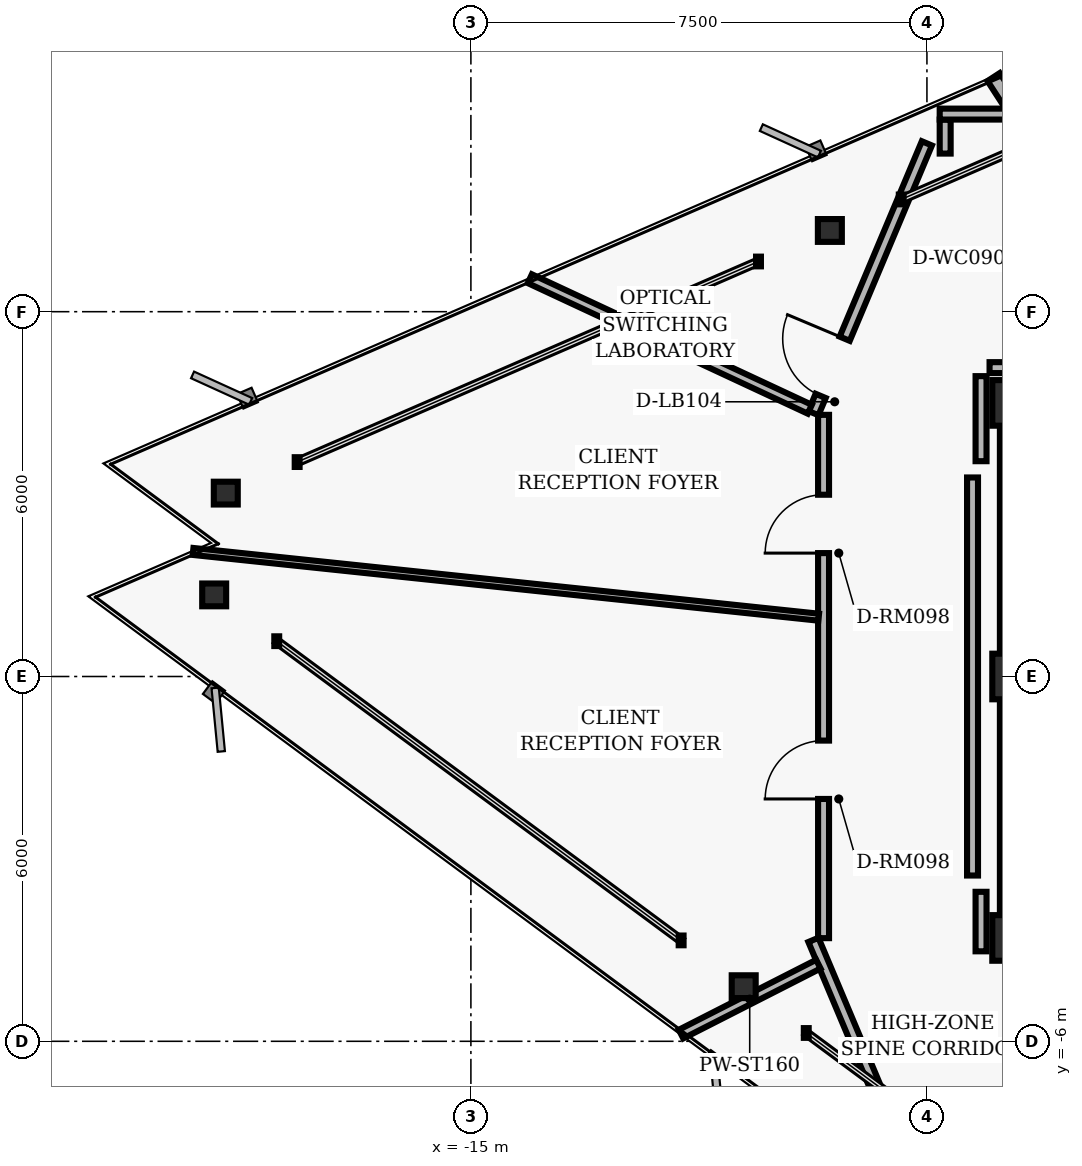
"""IFC4 building model, lengths in metres.
Left out: names, types, materials, properties, quantities, classifications, styles, units other than length and angle.
Written with IfcOpenShell. Run it as: python <this file> out.ifc"""

import sys

from ifc_helpers import new_model, si_unit, direction, frame, frame_2d, origin, origin_2d, place, context, subcontext, project, spatial, rectangle, hollow_rectangle, i_section, extrude, element, fill, save


model = new_model("IFC4")
c1 = context("Model", 3, precision=1e-05, world=origin(), true_north=direction((0.0, 1.0)))
c2 = subcontext(c1, "Body", "Model", "MODEL_VIEW")
j1 = project(units=[si_unit("LENGTHUNIT", "METRE"), si_unit("PLANEANGLEUNIT", "RADIAN")], contexts=[c1])
p1 = place(None, origin())
s1 = spatial("IfcSite", under=j1, at=p1, CompositionType="ELEMENT")
p2 = place(p1, origin())
s2 = spatial("IfcBuilding", under=s1, at=p2, CompositionType="ELEMENT")
p3 = place(p2, frame((0.0, 0.0, 224.0)))
s3 = spatial("IfcBuildingStorey", under=s2, at=p3, CompositionType="ELEMENT", Elevation=224.0)
for number, where, z_axis, x_axis in (
    (1, (-6.05, 4.5, 0.0), (0.0, 0.0, 1.0), (1.0, 0.0, 0.0)),
    (2, (-6.05, 0.0, 0.0), (0.0, 0.0, 1.0), (1.0, 0.0, 0.0)),
    (3, (-6.05, -4.3, 0.0), (0.0, 0.0, 1.0), (1.0, 0.0, 0.0)),
):
    element("IfcColumn", number, at=place(p3, frame(where, z_axis=z_axis, x_axis=x_axis)), inside=s3, PredefinedType="COLUMN", context=c2, shape_type="SweptSolid", body=[
        extrude(hollow_rectangle(XDim=0.75, YDim=0.75, WallThickness=0.05, InnerFilletRadius=0.02, OuterFilletRadius=0.04, at=origin_2d()), origin(), (0.0, 0.0, 1.0), 3.04),
    ])
p4 = place(p3, frame((-6.05, 0.375, 0.0), z_axis=(0.0, 0.0, 1.0), x_axis=(0.0, 1.0, 0.0)))
e4 = element("IfcWall", 4, at=p4, inside=s3, PredefinedType="SHEAR", context=c2, shape_type="SweptSolid", body=[
    extrude(rectangle(XDim=3.75, YDim=0.5, at=frame_2d((1.875, 0.0))), origin(), (0.0, 0.0, 1.0), 2.798),
])
p5 = place(p3, frame((-6.05, -3.925, 0.0), z_axis=(0.0, 0.0, 1.0), x_axis=(0.0, 1.0, 0.0)))
e5 = element("IfcWall", 5, at=p5, inside=s3, PredefinedType="SHEAR", context=c2, shape_type="SweptSolid", body=[
    extrude(rectangle(XDim=3.55, YDim=0.5, at=frame_2d((1.775, 0.0))), origin(), (0.0, 0.0, 1.0), 2.798),
])
for number, where, z_axis, x_axis in (
    (6, (-9.096, 7.336, 0.0), (0.0, 0.0, 1.0), (1.0, 0.0, 0.0)),
    (7, (-19.031, 3.016, 0.0), (0.0, 0.0, 1.0), (1.0, 0.0, 0.0)),
    (8, (-19.222, 1.342, 0.0), (0.0, 0.0, 1.0), (1.0, 0.0, 0.0)),
    (9, (-10.513, -5.102, 0.0), (0.0, 0.0, 1.0), (1.0, 0.0, 0.0)),
):
    element("IfcColumn", number, at=place(p3, frame(where, z_axis=z_axis, x_axis=x_axis)), inside=s3, PredefinedType="COLUMN", context=c2, shape_type="SweptSolid", body=[
        extrude(i_section(OverallWidth=0.394, OverallDepth=0.375, WebThickness=0.017, FlangeThickness=0.028, FilletRadius=0.016, at=origin_2d()), origin(), (0.0, 0.0, 1.0), 3.04),
    ])
p6 = place(p3, frame((-7.574, -8.596, 0.0), z_axis=(0.0, 0.0, 1.0), x_axis=(-0.38757793583, 0.921836939842, 0.0)))
e10 = element("IfcWall", 10, at=p6, inside=s3, PredefinedType="PARTITIONING", context=c2, shape_type="SweptSolid", body=[
    extrude(rectangle(XDim=4.625, YDim=0.18, at=frame_2d((2.313, 0.0))), origin(), (0.0, 0.0, 1.0), 2.773),
])
p7 = place(p3, frame((-9.2, -4.303, 0.0), z_axis=(0.0, 0.0, 1.0), x_axis=(0.0, 1.0, 0.0)))
e11 = element("IfcWall", 11, at=p7, inside=s3, PredefinedType="PARTITIONING", context=c2, shape_type="SweptSolid", body=[
    extrude(rectangle(XDim=8.607, YDim=0.18, at=frame_2d((4.303, 0.0))), origin(), (0.0, 0.0, 1.0), 2.773),
])
p8 = place(p7, frame((2.289, 0.0, 0.0)))
e12 = element("IfcOpeningElement", 12, at=p8, cuts=e11, PredefinedType="OPENING", context=c2, shape_type="SweptSolid", body=[
    extrude(rectangle(XDim=0.96, YDim=2.02, at=frame_2d((0.48, 1.01))), frame((0.0, 0.1, 0.0), z_axis=(0.0, -1.0, 0.0), x_axis=(1.0, 0.0, 0.0)), (0.0, 0.0, 1.0), 0.2),
])
p9 = place(p7, frame((6.333, 0.0, 0.0)))
e13 = element("IfcOpeningElement", 13, at=p9, cuts=e11, PredefinedType="OPENING", context=c2, shape_type="SweptSolid", body=[
    extrude(rectangle(XDim=0.96, YDim=2.02, at=frame_2d((0.48, 1.01))), frame((0.0, 0.1, 0.0), z_axis=(0.0, -1.0, 0.0), x_axis=(1.0, 0.0, 0.0)), (0.0, 0.0, 1.0), 0.2),
])
p10 = place(p3, frame((-9.367, 4.332, 0.0), z_axis=(0.0, 0.0, 1.0), x_axis=(0.387573945081, 0.921838617706, 0.0)))
e14 = element("IfcWall", 14, at=p10, inside=s3, PredefinedType="PARTITIONING", context=c2, shape_type="SweptSolid", body=[
    extrude(rectangle(XDim=4.813, YDim=0.18, at=frame_2d((2.407, 0.0))), origin(), (0.0, 0.0, 1.0), 2.773),
])
p11 = place(p10, frame((0.307, 0.0, 0.0)))
e15 = element("IfcOpeningElement", 15, at=p11, cuts=e14, PredefinedType="OPENING", context=c2, shape_type="SweptSolid", body=[
    extrude(rectangle(XDim=1.02, YDim=2.02, at=frame_2d((0.51, 1.01))), frame((0.0, 0.1, 0.0), z_axis=(0.0, -1.0, 0.0), x_axis=(1.0, 0.0, 0.0)), (0.0, 0.0, 1.0), 0.2),
])
p12 = place(p3, frame((-7.2, 8.601, 0.0), z_axis=(0.0, 0.0, 1.0), x_axis=(0.0, 1.0, 0.0)))
e16 = element("IfcWall", 16, at=p12, inside=s3, PredefinedType="PARTITIONING", context=c2, shape_type="SweptSolid", body=[
    extrude(rectangle(XDim=0.559, YDim=0.18, at=frame_2d((0.28, 0.0))), origin(), (0.0, 0.0, 1.0), 2.773),
])
p13 = place(p3, frame((-7.29, 9.25, 0.0), z_axis=(0.0, 0.0, 1.0), x_axis=(1.0, 0.0, 0.0)))
e17 = element("IfcWall", 17, at=p13, inside=s3, PredefinedType="PARTITIONING", context=c2, shape_type="SweptSolid", body=[
    extrude(rectangle(XDim=13.3, YDim=0.18, at=frame_2d((6.65, 0.0))), origin(), (0.0, 0.0, 1.0), 2.395),
])
p14 = place(p13, frame((9.929, 0.0, 0.0)))
e18 = element("IfcOpeningElement", 18, at=p14, cuts=e17, PredefinedType="OPENING", context=c2, shape_type="SweptSolid", body=[
    extrude(rectangle(XDim=0.96, YDim=2.02, at=frame_2d((0.48, 1.01))), frame((0.0, 0.1, 0.0), z_axis=(0.0, -1.0, 0.0), x_axis=(1.0, 0.0, 0.0)), (0.0, 0.0, 1.0), 0.2),
])
p15 = place(p13, frame((4.02, 0.0, 0.0)))
e19 = element("IfcOpeningElement", 19, at=p15, cuts=e17, PredefinedType="OPENING", context=c2, shape_type="SweptSolid", body=[
    extrude(rectangle(XDim=0.96, YDim=2.02, at=frame_2d((0.48, 1.01))), frame((0.0, 0.1, 0.0), z_axis=(0.0, -1.0, 0.0), x_axis=(1.0, 0.0, 0.0)), (0.0, 0.0, 1.0), 0.2),
])
p16 = place(p3, frame((-5.881, 5.08, 0.0), z_axis=(0.0, 0.0, 1.0), x_axis=(-1.0, 0.0, 0.0)))
e20 = element("IfcWall", 20, at=p16, inside=s3, PredefinedType="PARTITIONING", context=c2, shape_type="SweptSolid", body=[
    extrude(rectangle(XDim=0.589, YDim=0.18, at=frame_2d((0.294, 0.0))), origin(), (0.0, 0.0, 1.0), 2.773),
])
p17 = place(p3, frame((-6.61, 4.94, 0.0), z_axis=(0.0, 0.0, 1.0), x_axis=(0.0, -1.0, 0.0)))
e21 = element("IfcWall", 21, at=p17, inside=s3, PredefinedType="PARTITIONING", context=c2, shape_type="SweptSolid", body=[
    extrude(rectangle(XDim=1.399, YDim=0.18, at=frame_2d((0.699, 0.0))), origin(), (0.0, 0.0, 1.0), 2.773),
])
p18 = place(p3, frame((-6.75, 3.273, 0.0), z_axis=(0.0, 0.0, 1.0), x_axis=(0.0, -1.0, 0.0)))
e22 = element("IfcWall", 22, at=p18, inside=s3, PredefinedType="PARTITIONING", context=c2, shape_type="SweptSolid", body=[
    extrude(rectangle(XDim=6.547, YDim=0.18, at=frame_2d((3.273, 0.0))), origin(), (0.0, 0.0, 1.0), 2.773),
])
p19 = place(p3, frame((-6.61, -3.541, 0.0), z_axis=(0.0, 0.0, 1.0), x_axis=(0.0, -1.0, 0.0)))
e23 = element("IfcWall", 23, at=p19, inside=s3, PredefinedType="PARTITIONING", context=c2, shape_type="SweptSolid", body=[
    extrude(rectangle(XDim=0.979, YDim=0.18, at=frame_2d((0.489, 0.0))), origin(), (0.0, 0.0, 1.0), 2.773),
])
p20 = place(p3, frame((-9.286, -4.731, 0.0), z_axis=(0.0, 0.0, 1.0), x_axis=(-0.890990970919, -0.454021023456, 0.0)))
e24 = element("IfcWall", 24, at=p20, inside=s3, PredefinedType="PARTITIONING", context=c2, shape_type="SweptSolid", body=[
    extrude(rectangle(XDim=2.534, YDim=0.16, at=frame_2d((1.267, 0.0))), origin(), (0.0, 0.0, 1.0), 2.773),
])
p21 = place(p3, frame((-6.059, 9.33, 0.0), z_axis=(0.0, 0.0, 1.0), x_axis=(-0.54466198204, 0.838655665527, 0.0)))
e25 = element("IfcWall", 25, at=p21, inside=s3, PredefinedType="PARTITIONING", context=c2, shape_type="SweptSolid", body=[
    extrude(rectangle(XDim=0.631, YDim=0.24, at=frame_2d((0.315, 0.0))), origin(), (0.0, 0.0, 1.0), 2.773),
])
p22 = place(p3, frame((-9.427, 4.396, 0.0), z_axis=(0.0, 0.0, 1.0), x_axis=(-0.906319380456, 0.422593398682, 0.0)))
e26 = element("IfcWall", 26, at=p22, inside=s3, PredefinedType="PARTITIONING", context=c2, shape_type="SweptSolid", body=[
    extrude(rectangle(XDim=5.08, YDim=0.16, at=frame_2d((2.54, 0.0))), origin(), (0.0, 0.0, 1.0), 2.773),
])
p23 = place(p3, frame((-9.28, 0.975, 0.0), z_axis=(0.0, 0.0, 1.0), x_axis=(-0.994520958229, 0.104537379166, 0.0)))
e27 = element("IfcWall", 27, at=p23, inside=s3, PredefinedType="MOVABLE", context=c2, shape_type="SweptSolid", body=[
    extrude(rectangle(XDim=10.346, YDim=0.115, at=frame_2d((5.173, 0.0))), origin(), (0.0, 0.0, 1.0), 2.773),
])
p24 = place(p8, origin())
e28 = element("IfcDoor", 28, at=p24, inside=s3, OperationType="SINGLE_SWING_LEFT", PredefinedType="DOOR", context=c2, shape_type="SweptSolid", body=[
    extrude(rectangle(XDim=0.96, YDim=2.02, at=frame_2d((0.48, 1.01))), frame((0.0, 0.025, 0.0), z_axis=(0.0, -1.0, 0.0), x_axis=(1.0, 0.0, 0.0)), (0.0, 0.0, 1.0), 0.05),
])
fill(e12, e28)
p25 = place(p11, origin())
e29 = element("IfcDoor", 29, at=p25, inside=s3, OperationType="SINGLE_SWING_RIGHT", PredefinedType="DOOR", context=c2, shape_type="SweptSolid", body=[
    extrude(rectangle(XDim=1.02, YDim=2.02, at=frame_2d((0.51, 1.01))), frame((0.0, 0.025, 0.0), z_axis=(0.0, -1.0, 0.0), x_axis=(1.0, 0.0, 0.0)), (0.0, 0.0, 1.0), 0.05),
])
fill(e15, e29)
p26 = place(p9, origin())
e30 = element("IfcDoor", 30, at=p26, inside=s3, OperationType="SINGLE_SWING_LEFT", PredefinedType="DOOR", context=c2, shape_type="SweptSolid", body=[
    extrude(rectangle(XDim=0.96, YDim=2.02, at=frame_2d((0.48, 1.01))), frame((0.0, 0.025, 0.0), z_axis=(0.0, -1.0, 0.0), x_axis=(1.0, 0.0, 0.0)), (0.0, 0.0, 1.0), 0.05),
])
fill(e13, e30)
save(model, sys.argv[1])
